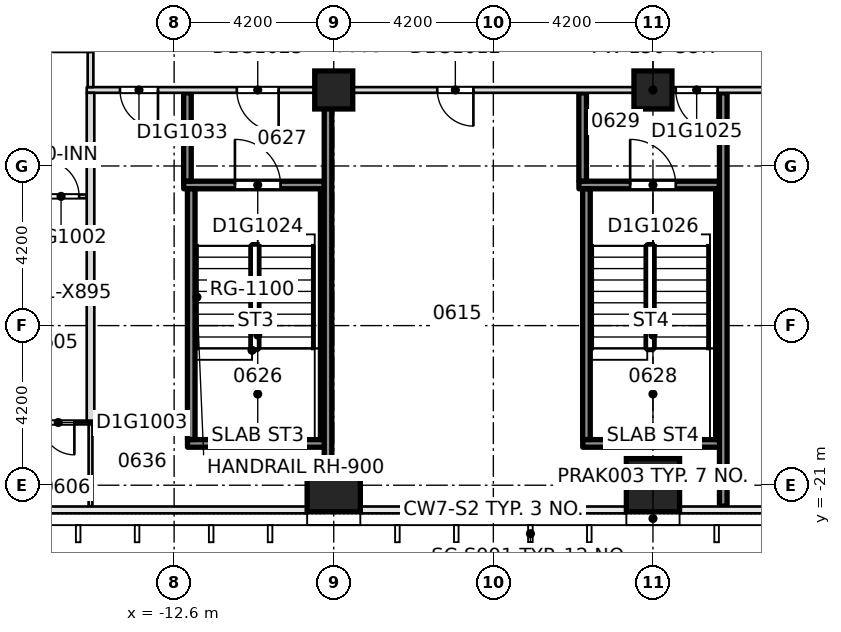
"""IFC4 building model, lengths in metres.
Left out: names, types, materials, properties, quantities, classifications, styles, units other than length and angle.
Written with IfcOpenShell. Run it as: python <this file> out.ifc"""

import sys

from ifc_helpers import new_model, si_unit, direction, frame, frame_2d, origin, origin_2d, place, context, subcontext, project, spatial, rectangle, extrude, element, fill, save


model = new_model("IFC4")
c1 = context("Model", 3, precision=1e-05, world=origin(), true_north=direction((0.0, 1.0)))
c2 = subcontext(c1, "Body", "Model", "MODEL_VIEW")
j1 = project(units=[si_unit("LENGTHUNIT", "METRE"), si_unit("PLANEANGLEUNIT", "RADIAN")], contexts=[c1])
p1 = place(None, origin())
s1 = spatial("IfcSite", under=j1, at=p1, CompositionType="ELEMENT")
p2 = place(p1, origin())
s2 = spatial("IfcBuilding", under=s1, at=p2, CompositionType="ELEMENT")
p3 = place(p2, frame((0.0, 0.0, 34.5)))
s3 = spatial("IfcBuildingStorey", under=s2, at=p3, CompositionType="ELEMENT", Elevation=34.5)
for number, where, z_axis, x_axis in (
    (1, (-8.4, -21.0, -0.32), (0.0, 0.0, 1.0), (1.0, 0.0, 0.0)),
    (2, (0.0, -21.0, -0.32), (0.0, 0.0, 1.0), (1.0, 0.0, 0.0)),
):
    element("IfcColumn", number, at=place(p3, frame(where, z_axis=z_axis, x_axis=x_axis)), inside=s3, PredefinedType="COLUMN", context=c2, shape_type="SweptSolid", body=[
        extrude(rectangle(XDim=1.4, YDim=1.4, at=origin_2d()), origin(), (0.0, 0.0, 1.0), 3.45),
    ])
for number, where, z_axis, x_axis in (
    (3, (-8.4, -10.6, -0.32), (0.0, 0.0, 1.0), (1.0, 0.0, 0.0)),
    (4, (0.0, -10.6, -0.32), (0.0, 0.0, 1.0), (1.0, 0.0, 0.0)),
):
    element("IfcColumn", number, at=place(p3, frame(where, z_axis=z_axis, x_axis=x_axis)), inside=s3, PredefinedType="COLUMN", context=c2, shape_type="SweptSolid", body=[
        extrude(rectangle(XDim=1.0, YDim=1.0, at=origin_2d()), origin(), (0.0, 0.0, 1.0), 3.45),
    ])
p4 = place(p3, frame((-12.248, -19.9, 0.0), z_axis=(0.0, 0.0, 1.0), x_axis=(1.0, 0.0, 0.0)))
e5 = element("IfcWall", 5, at=p4, inside=s3, PredefinedType="SOLIDWALL", context=c2, shape_type="SweptSolid", body=[
    extrude(rectangle(XDim=3.696, YDim=0.2, at=frame_2d((1.848, 0.0))), origin(), (0.0, 0.0, 1.0), 3.13),
])
p5 = place(p3, frame((-1.848, -19.9, 0.0), z_axis=(0.0, 0.0, 1.0), x_axis=(1.0, 0.0, 0.0)))
e6 = element("IfcWall", 6, at=p5, inside=s3, PredefinedType="SOLIDWALL", context=c2, shape_type="SweptSolid", body=[
    extrude(rectangle(XDim=3.696, YDim=0.2, at=frame_2d((1.848, 0.0))), origin(), (0.0, 0.0, 1.0), 3.13),
])
p6 = place(p3, frame((-17.35, -19.35, 0.0), z_axis=(0.0, 0.0, 1.0), x_axis=(1.0, 0.0, 0.0)))
e7 = element("IfcWall", 7, at=p6, inside=s3, PredefinedType="PARTITIONING", context=c2, shape_type="SweptSolid", body=[
    extrude(rectangle(XDim=2.65, YDim=0.1, at=frame_2d((1.325, 0.0))), origin(), (0.0, 0.0, 1.0), 3.13),
])
p7 = place(p6, frame((1.275, 0.0, 0.0)))
e8 = element("IfcOpeningElement", 8, at=p7, cuts=e7, PredefinedType="OPENING", context=c2, shape_type="SweptSolid", body=[
    extrude(rectangle(XDim=0.85, YDim=2.1, at=frame_2d((0.425, 1.05))), frame((0.0, 0.06, 0.0), z_axis=(0.0, -1.0, 0.0), x_axis=(1.0, 0.0, 0.0)), (0.0, 0.0, 1.0), 0.12),
])
p8 = place(p3, frame((-17.35, -13.4, 0.0), z_axis=(0.0, 0.0, 1.0), x_axis=(1.0, 0.0, 0.0)))
e9 = element("IfcWall", 9, at=p8, inside=s3, PredefinedType="PARTITIONING", context=c2, shape_type="SweptSolid", body=[
    extrude(rectangle(XDim=2.45, YDim=0.1, at=frame_2d((1.225, 0.0))), origin(), (0.0, 0.0, 1.0), 3.13),
])
p9 = place(p8, frame((1.3, 0.0, 0.0)))
e10 = element("IfcOpeningElement", 10, at=p9, cuts=e9, PredefinedType="OPENING", context=c2, shape_type="SweptSolid", body=[
    extrude(rectangle(XDim=0.95, YDim=2.1, at=frame_2d((0.475, 1.05))), frame((0.0, 0.06, 0.0), z_axis=(0.0, -1.0, 0.0), x_axis=(1.0, 0.0, 0.0)), (0.0, 0.0, 1.0), 0.12),
])
p10 = place(p3, frame((-12.348, -13.1, 0.0), z_axis=(0.0, 0.0, 1.0), x_axis=(1.0, 0.0, 0.0)))
e11 = element("IfcWall", 11, at=p10, inside=s3, PredefinedType="SOLIDWALL", context=c2, shape_type="SweptSolid", body=[
    extrude(rectangle(XDim=3.696, YDim=0.2, at=frame_2d((1.848, 0.0))), origin(), (0.0, 0.0, 1.0), 3.13),
])
p11 = place(p10, frame((1.348, 0.0, 0.0)))
e12 = element("IfcOpeningElement", 12, at=p11, cuts=e11, PredefinedType="OPENING", context=c2, shape_type="SweptSolid", body=[
    extrude(rectangle(XDim=1.2, YDim=2.1, at=frame_2d((0.6, 1.05))), frame((0.0, 0.11, 0.0), z_axis=(0.0, -1.0, 0.0), x_axis=(1.0, 0.0, 0.0)), (0.0, 0.0, 1.0), 0.22),
])
p12 = place(p3, frame((-1.948, -13.1, 0.0), z_axis=(0.0, 0.0, 1.0), x_axis=(1.0, 0.0, 0.0)))
e13 = element("IfcWall", 13, at=p12, inside=s3, PredefinedType="SOLIDWALL", context=c2, shape_type="SweptSolid", body=[
    extrude(rectangle(XDim=3.696, YDim=0.2, at=frame_2d((1.848, 0.0))), origin(), (0.0, 0.0, 1.0), 3.13),
])
p13 = place(p12, frame((1.348, 0.0, 0.0)))
e14 = element("IfcOpeningElement", 14, at=p13, cuts=e13, PredefinedType="OPENING", context=c2, shape_type="SweptSolid", body=[
    extrude(rectangle(XDim=1.2, YDim=2.1, at=frame_2d((0.6, 1.05))), frame((0.0, 0.11, 0.0), z_axis=(0.0, -1.0, 0.0), x_axis=(1.0, 0.0, 0.0)), (0.0, 0.0, 1.0), 0.22),
])
p14 = place(p3, frame((-14.9, -10.6, 0.0), z_axis=(0.0, 0.0, 1.0), x_axis=(1.0, 0.0, 0.0)))
e15 = element("IfcWall", 15, at=p14, inside=s3, PredefinedType="PARTITIONING", context=c2, shape_type="SweptSolid", body=[
    extrude(rectangle(XDim=29.8, YDim=0.15, at=frame_2d((14.9, 0.0))), origin(), (0.0, 0.0, 1.0), 3.13),
])
p15 = place(p14, frame((9.225, 0.0, 0.0)))
e16 = element("IfcOpeningElement", 16, at=p15, cuts=e15, PredefinedType="OPENING", context=c2, shape_type="SweptSolid", body=[
    extrude(rectangle(XDim=0.95, YDim=2.1, at=frame_2d((0.475, 1.05))), frame((0.0, 0.085, 0.0), z_axis=(0.0, -1.0, 0.0), x_axis=(1.0, 0.0, 0.0)), (0.0, 0.0, 1.0), 0.17),
])
p16 = place(p14, frame((19.625, 0.0, 0.0)))
e17 = element("IfcOpeningElement", 17, at=p16, cuts=e15, PredefinedType="OPENING", context=c2, shape_type="SweptSolid", body=[
    extrude(rectangle(XDim=0.95, YDim=2.1, at=frame_2d((0.475, 1.05))), frame((0.0, 0.085, 0.0), z_axis=(0.0, -1.0, 0.0), x_axis=(1.0, 0.0, 0.0)), (0.0, 0.0, 1.0), 0.17),
])
p17 = place(p14, frame((3.95, 0.0, 0.0)))
e18 = element("IfcOpeningElement", 18, at=p17, cuts=e15, PredefinedType="OPENING", context=c2, shape_type="SweptSolid", body=[
    extrude(rectangle(XDim=1.1, YDim=2.1, at=frame_2d((0.55, 1.05))), frame((0.0, 0.085, 0.0), z_axis=(0.0, -1.0, 0.0), x_axis=(1.0, 0.0, 0.0)), (0.0, 0.0, 1.0), 0.17),
])
p18 = place(p14, frame((15.5, 0.0, 0.0)))
e19 = element("IfcOpeningElement", 19, at=p18, cuts=e15, PredefinedType="OPENING", context=c2, shape_type="SweptSolid", body=[
    extrude(rectangle(XDim=1.1, YDim=2.1, at=frame_2d((0.55, 1.05))), frame((0.0, 0.085, 0.0), z_axis=(0.0, -1.0, 0.0), x_axis=(1.0, 0.0, 0.0)), (0.0, 0.0, 1.0), 0.17),
])
p19 = place(p14, frame((24.75, 0.0, 0.0)))
e20 = element("IfcOpeningElement", 20, at=p19, cuts=e15, PredefinedType="OPENING", context=c2, shape_type="SweptSolid", body=[
    extrude(rectangle(XDim=1.1, YDim=2.1, at=frame_2d((0.55, 1.05))), frame((0.0, 0.085, 0.0), z_axis=(0.0, -1.0, 0.0), x_axis=(1.0, 0.0, 0.0)), (0.0, 0.0, 1.0), 0.17),
])
p20 = place(p14, frame((0.875, 0.0, 0.0)))
e21 = element("IfcOpeningElement", 21, at=p20, cuts=e15, PredefinedType="OPENING", context=c2, shape_type="SweptSolid", body=[
    extrude(rectangle(XDim=1.0, YDim=2.1, at=frame_2d((0.5, 1.05))), frame((0.0, 0.085, 0.0), z_axis=(0.0, -1.0, 0.0), x_axis=(1.0, 0.0, 0.0)), (0.0, 0.0, 1.0), 0.17),
])
p21 = place(p14, frame((27.925, 0.0, 0.0)))
e22 = element("IfcOpeningElement", 22, at=p21, cuts=e15, PredefinedType="OPENING", context=c2, shape_type="SweptSolid", body=[
    extrude(rectangle(XDim=1.0, YDim=2.1, at=frame_2d((0.5, 1.05))), frame((0.0, 0.085, 0.0), z_axis=(0.0, -1.0, 0.0), x_axis=(1.0, 0.0, 0.0)), (0.0, 0.0, 1.0), 0.17),
])
p22 = place(p3, frame((-14.8, -21.55, 0.0), z_axis=(0.0, 0.0, 1.0), x_axis=(0.0, 1.0, 0.0)))
e23 = element("IfcWall", 23, at=p22, inside=s3, PredefinedType="PARTITIONING", context=c2, shape_type="SweptSolid", body=[
    extrude(rectangle(XDim=2.15, YDim=0.1, at=frame_2d((1.075, 0.0))), origin(), (0.0, 0.0, 1.0), 3.13),
])
p23 = place(p3, frame((-14.8, -19.3, 0.0), z_axis=(0.0, 0.0, 1.0), x_axis=(0.0, 1.0, 0.0)))
e24 = element("IfcWall", 24, at=p23, inside=s3, PredefinedType="PARTITIONING", context=c2, shape_type="SweptSolid", body=[
    extrude(rectangle(XDim=8.625, YDim=0.2, at=frame_2d((4.312, 0.0))), origin(), (0.0, 0.0, 1.0), 3.13),
])
p24 = place(p3, frame((-14.8, -10.525, 0.0), z_axis=(0.0, 0.0, 1.0), x_axis=(0.0, 1.0, 0.0)))
e25 = element("IfcWall", 25, at=p24, inside=s3, PredefinedType="PARTITIONING", context=c2, shape_type="SweptSolid", body=[
    extrude(rectangle(XDim=23.825, YDim=0.15, at=frame_2d((11.913, 0.0))), origin(), (0.0, 0.0, 1.0), 3.13),
])
p25 = place(p24, frame((0.925, 0.0, 0.0)))
e26 = element("IfcOpeningElement", 26, at=p25, cuts=e25, PredefinedType="OPENING", context=c2, shape_type="SweptSolid", body=[
    extrude(rectangle(XDim=1.0, YDim=2.1, at=frame_2d((0.5, 1.05))), frame((0.0, 0.085, 0.0), z_axis=(0.0, -1.0, 0.0), x_axis=(1.0, 0.0, 0.0)), (0.0, 0.0, 1.0), 0.17),
])
p26 = place(p24, frame((16.065, 0.0, 0.0)))
e27 = element("IfcOpeningElement", 27, at=p26, cuts=e25, PredefinedType="OPENING", context=c2, shape_type="SweptSolid", body=[
    extrude(rectangle(XDim=1.0, YDim=2.1, at=frame_2d((0.5, 1.05))), frame((0.0, 0.085, 0.0), z_axis=(0.0, -1.0, 0.0), x_axis=(1.0, 0.0, 0.0)), (0.0, 0.0, 1.0), 0.17),
])
p27 = place(p24, frame((21.065, 0.0, 0.0)))
e28 = element("IfcOpeningElement", 28, at=p27, cuts=e25, PredefinedType="OPENING", context=c2, shape_type="SweptSolid", body=[
    extrude(rectangle(XDim=0.95, YDim=2.1, at=frame_2d((0.475, 1.05))), frame((0.0, 0.085, 0.0), z_axis=(0.0, -1.0, 0.0), x_axis=(1.0, 0.0, 0.0)), (0.0, 0.0, 1.0), 0.17),
])
p28 = place(p24, frame((9.975, 0.0, 0.0)))
e29 = element("IfcOpeningElement", 29, at=p28, cuts=e25, PredefinedType="OPENING", context=c2, shape_type="SweptSolid", body=[
    extrude(rectangle(XDim=1.1, YDim=2.1, at=frame_2d((0.55, 1.05))), frame((0.0, 0.085, 0.0), z_axis=(0.0, -1.0, 0.0), x_axis=(1.0, 0.0, 0.0)), (0.0, 0.0, 1.0), 0.17),
])
p29 = place(p24, frame((4.725, 0.0, 0.0)))
e30 = element("IfcOpeningElement", 30, at=p29, cuts=e25, PredefinedType="OPENING", context=c2, shape_type="SweptSolid", body=[
    extrude(rectangle(XDim=1.0, YDim=2.1, at=frame_2d((0.5, 1.05))), frame((0.0, 0.085, 0.0), z_axis=(0.0, -1.0, 0.0), x_axis=(1.0, 0.0, 0.0)), (0.0, 0.0, 1.0), 0.17),
])
p30 = place(p3, frame((-12.25, -12.998, 0.0), z_axis=(0.0, 0.0, 1.0), x_axis=(0.0, 1.0, 0.0)))
e31 = element("IfcWall", 31, at=p30, inside=s3, PredefinedType="SOLIDWALL", context=c2, shape_type="SweptSolid", body=[
    extrude(rectangle(XDim=2.323, YDim=0.2, at=frame_2d((1.162, 0.0))), origin(), (0.0, 0.0, 1.0), 3.13),
])
for number, where, z_axis, x_axis in (
    (32, (-12.15, -19.798, 0.0), (0.0, 0.0, 1.0), (0.0, 1.0, 0.0)),
    (33, (-8.65, -19.798, 0.0), (0.0, 0.0, 1.0), (0.0, 1.0, 0.0)),
):
    element("IfcWall", number, at=place(p3, frame(where, z_axis=z_axis, x_axis=x_axis)), inside=s3, PredefinedType="SOLIDWALL", context=c2, shape_type="SweptSolid", body=[
        extrude(rectangle(XDim=6.596, YDim=0.2, at=frame_2d((3.298, 0.0))), origin(), (0.0, 0.0, 1.0), 3.13),
    ])
p31 = place(p3, frame((-1.85, -12.998, 0.0), z_axis=(0.0, 0.0, 1.0), x_axis=(0.0, 1.0, 0.0)))
e34 = element("IfcWall", 34, at=p31, inside=s3, PredefinedType="SOLIDWALL", context=c2, shape_type="SweptSolid", body=[
    extrude(rectangle(XDim=2.323, YDim=0.2, at=frame_2d((1.162, 0.0))), origin(), (0.0, 0.0, 1.0), 3.13),
])
for number, where, z_axis, x_axis in (
    (35, (-1.75, -19.798, 0.0), (0.0, 0.0, 1.0), (0.0, 1.0, 0.0)),
    (36, (1.75, -19.798, 0.0), (0.0, 0.0, 1.0), (0.0, 1.0, 0.0)),
):
    element("IfcWall", number, at=place(p3, frame(where, z_axis=z_axis, x_axis=x_axis)), inside=s3, PredefinedType="SOLIDWALL", context=c2, shape_type="SweptSolid", body=[
        extrude(rectangle(XDim=6.596, YDim=0.2, at=frame_2d((3.298, 0.0))), origin(), (0.0, 0.0, 1.0), 3.13),
    ])
for number, where, z_axis, x_axis in (
    (37, (1.85, -21.55, 0.0), (0.0, 0.0, 1.0), (0.0, 1.0, 0.0)),
    (38, (-8.55, -21.55, 0.0), (0.0, 0.0, 1.0), (0.0, 1.0, 0.0)),
):
    element("IfcWall", number, at=place(p3, frame(where, z_axis=z_axis, x_axis=x_axis)), inside=s3, PredefinedType="SOLIDWALL", context=c2, shape_type="SweptSolid", body=[
        extrude(rectangle(XDim=10.875, YDim=0.2, at=frame_2d((5.438, 0.0))), origin(), (0.0, 0.0, 1.0), 3.13),
    ])
p32 = place(p9, origin())
e39 = element("IfcDoor", 39, at=p32, inside=s3, OperationType="SINGLE_SWING_RIGHT", PredefinedType="DOOR", context=c2, shape_type="SweptSolid", body=[
    extrude(rectangle(XDim=0.95, YDim=2.1, at=frame_2d((0.475, 1.05))), frame((0.0, 0.025, 0.0), z_axis=(0.0, -1.0, 0.0), x_axis=(1.0, 0.0, 0.0)), (0.0, 0.0, 1.0), 0.05),
])
fill(e10, e39)
p33 = place(p7, origin())
e40 = element("IfcDoor", 40, at=p33, inside=s3, OperationType="SINGLE_SWING_RIGHT", PredefinedType="DOOR", context=c2, shape_type="SweptSolid", body=[
    extrude(rectangle(XDim=0.85, YDim=2.1, at=frame_2d((0.425, 1.05))), frame((0.0, 0.025, 0.0), z_axis=(0.0, -1.0, 0.0), x_axis=(1.0, 0.0, 0.0)), (0.0, 0.0, 1.0), 0.05),
])
fill(e8, e40)
p34 = place(p15, origin())
e41 = element("IfcDoor", 41, at=p34, inside=s3, OperationType="SINGLE_SWING_LEFT", PredefinedType="DOOR", context=c2, shape_type="SweptSolid", body=[
    extrude(rectangle(XDim=0.95, YDim=2.1, at=frame_2d((0.475, 1.05))), frame((0.0, 0.025, 0.0), z_axis=(0.0, -1.0, 0.0), x_axis=(1.0, 0.0, 0.0)), (0.0, 0.0, 1.0), 0.05),
])
fill(e16, e41)
p35 = place(p17, origin())
e42 = element("IfcDoor", 42, at=p35, inside=s3, OperationType="SINGLE_SWING_RIGHT", PredefinedType="DOOR", context=c2, shape_type="SweptSolid", body=[
    extrude(rectangle(XDim=1.1, YDim=2.1, at=frame_2d((0.55, 1.05))), frame((0.0, 0.025, 0.0), z_axis=(0.0, -1.0, 0.0), x_axis=(1.0, 0.0, 0.0)), (0.0, 0.0, 1.0), 0.05),
])
fill(e18, e42)
p36 = place(p11, origin())
e43 = element("IfcDoor", 43, at=p36, inside=s3, OperationType="SINGLE_SWING_RIGHT", PredefinedType="DOOR", context=c2, shape_type="SweptSolid", body=[
    extrude(rectangle(XDim=1.2, YDim=2.1, at=frame_2d((0.6, 1.05))), frame((0.0, 0.025, 0.0), z_axis=(0.0, -1.0, 0.0), x_axis=(1.0, 0.0, 0.0)), (0.0, 0.0, 1.0), 0.05),
])
fill(e12, e43)
p37 = place(p18, origin())
e44 = element("IfcDoor", 44, at=p37, inside=s3, OperationType="SINGLE_SWING_LEFT", PredefinedType="DOOR", context=c2, shape_type="SweptSolid", body=[
    extrude(rectangle(XDim=1.1, YDim=2.1, at=frame_2d((0.55, 1.05))), frame((0.0, 0.025, 0.0), z_axis=(0.0, -1.0, 0.0), x_axis=(1.0, 0.0, 0.0)), (0.0, 0.0, 1.0), 0.05),
])
fill(e19, e44)
p38 = place(p13, origin())
e45 = element("IfcDoor", 45, at=p38, inside=s3, OperationType="SINGLE_SWING_RIGHT", PredefinedType="DOOR", context=c2, shape_type="SweptSolid", body=[
    extrude(rectangle(XDim=1.2, YDim=2.1, at=frame_2d((0.6, 1.05))), frame((0.0, 0.025, 0.0), z_axis=(0.0, -1.0, 0.0), x_axis=(1.0, 0.0, 0.0)), (0.0, 0.0, 1.0), 0.05),
])
fill(e14, e45)
p39 = place(p20, origin())
e46 = element("IfcDoor", 46, at=p39, inside=s3, OperationType="SINGLE_SWING_RIGHT", PredefinedType="DOOR", context=c2, shape_type="SweptSolid", body=[
    extrude(rectangle(XDim=1.0, YDim=2.1, at=frame_2d((0.5, 1.05))), frame((0.0, 0.025, 0.0), z_axis=(0.0, -1.0, 0.0), x_axis=(1.0, 0.0, 0.0)), (0.0, 0.0, 1.0), 0.05),
])
fill(e21, e46)
save(model, sys.argv[1])
